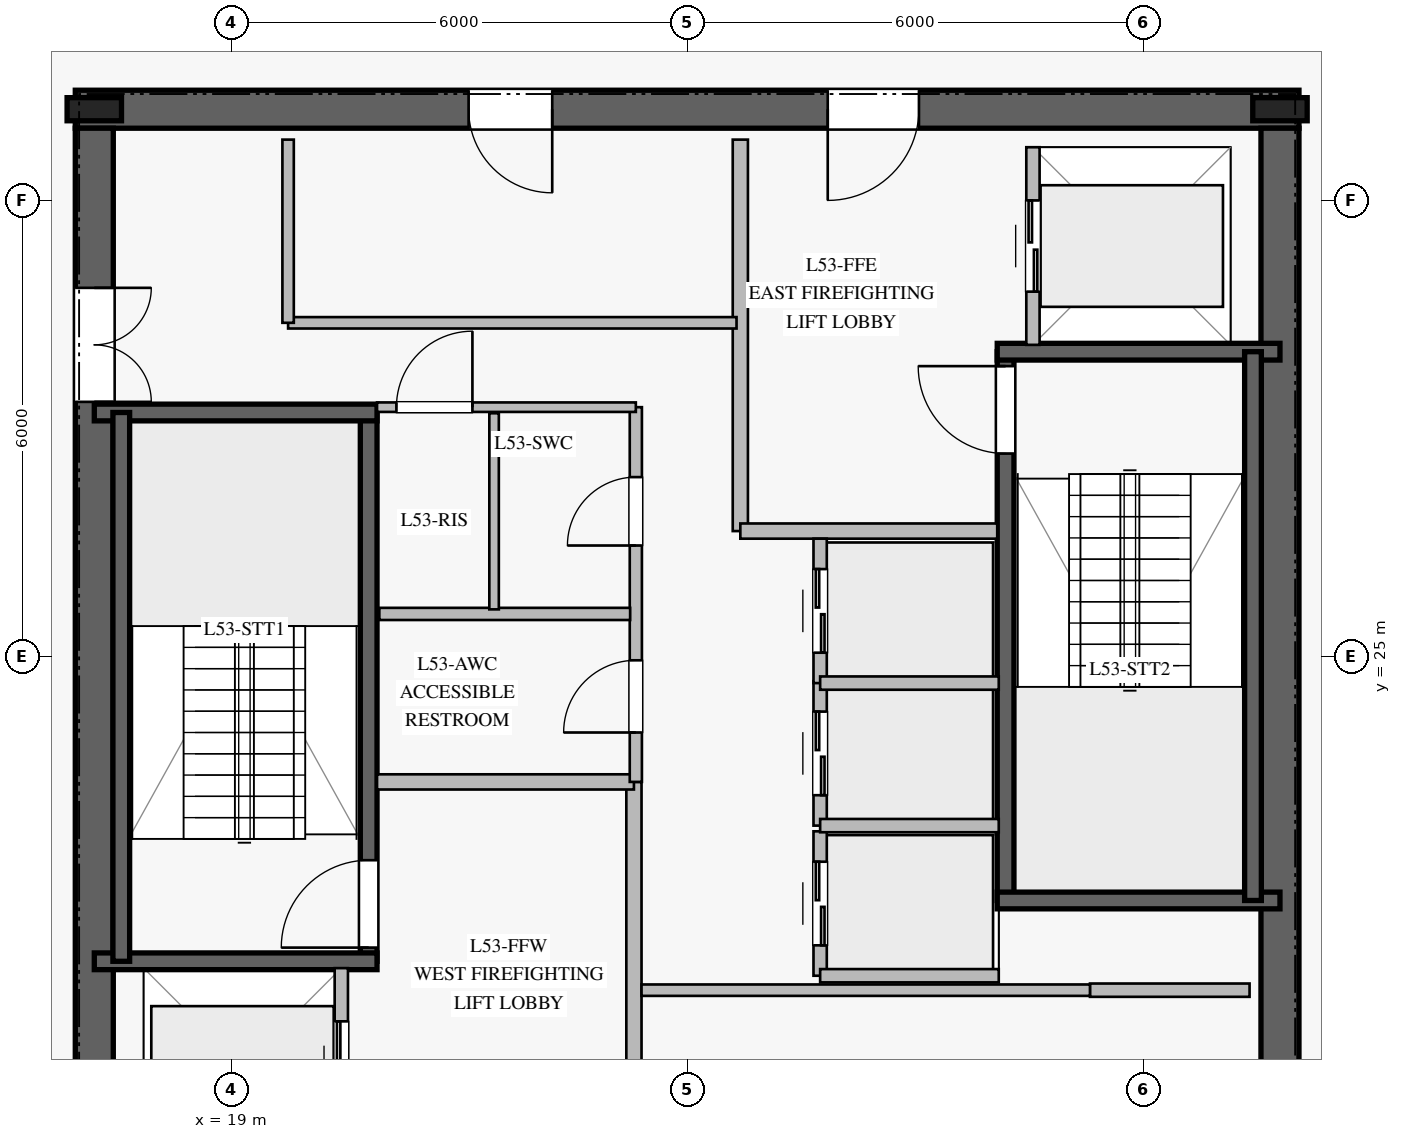
"""IFC4 building model, lengths in metres.
Left out: names, types, materials, properties, quantities, classifications, styles, units other than length and angle.
Written with IfcOpenShell. Run it as: python <this file> out.ifc"""

import sys

from ifc_helpers import new_model, si_unit, direction, frame, frame_2d, origin, origin_2d, place, context, subcontext, project, spatial, rectangle, i_section, extrude, element, fill, save


model = new_model("IFC4")
c1 = context("Model", 3, precision=1e-05, world=origin(), true_north=direction((0.0, 1.0)))
c2 = subcontext(c1, "Body", "Model", "MODEL_VIEW")
j1 = project(units=[si_unit("LENGTHUNIT", "METRE"), si_unit("PLANEANGLEUNIT", "RADIAN")], contexts=[c1])
p1 = place(None, origin())
s1 = spatial("IfcSite", under=j1, at=p1, CompositionType="ELEMENT")
p2 = place(p1, origin())
s2 = spatial("IfcBuilding", under=s1, at=p2, CompositionType="ELEMENT")
p3 = place(p2, frame((0.0, 0.0, 220.8)))
s3 = spatial("IfcBuildingStorey", under=s2, at=p3, CompositionType="ELEMENT", Elevation=220.8)
p4 = place(p3, frame((33.05, 32.2, 0.0), z_axis=(0.0, 0.0, 1.0), x_axis=(-1.0, 0.0, 0.0)))
e1 = element("IfcWall", 1, at=p4, inside=s3, PredefinedType="SHEAR", context=c2, shape_type="SweptSolid", body=[
    extrude(rectangle(XDim=16.1, YDim=0.5, at=frame_2d((8.05, 0.0))), origin(), (0.0, 0.0, 1.0), 3.78),
])
p5 = place(p4, frame((5.0, 0.0, 0.0)))
e2 = element("IfcOpeningElement", 2, at=p5, cuts=e1, PredefinedType="OPENING", context=c2, shape_type="SweptSolid", body=[
    extrude(rectangle(XDim=1.2, YDim=2.25, at=frame_2d((0.6, 1.125))), frame((0.0, 0.26, 0.0), z_axis=(0.0, -1.0, 0.0), x_axis=(1.0, 0.0, 0.0)), (0.0, 0.0, 1.0), 0.52),
])
p6 = place(p4, frame((9.825, 0.0, 0.0)))
e3 = element("IfcOpeningElement", 3, at=p6, cuts=e1, PredefinedType="OPENING", context=c2, shape_type="SweptSolid", body=[
    extrude(rectangle(XDim=1.1, YDim=2.2, at=frame_2d((0.55, 1.1))), frame((0.0, 0.26, 0.0), z_axis=(0.0, -1.0, 0.0), x_axis=(1.0, 0.0, 0.0)), (0.0, 0.0, 1.0), 0.52),
])
p7 = place(p3, frame((17.2, 31.95, 0.0), z_axis=(0.0, 0.0, 1.0), x_axis=(0.0, -1.0, 0.0)))
e4 = element("IfcWall", 4, at=p7, inside=s3, PredefinedType="SHEAR", context=c2, shape_type="SweptSolid", body=[
    extrude(rectangle(XDim=13.9, YDim=0.5, at=frame_2d((6.95, 0.0))), origin(), (0.0, 0.0, 1.0), 3.78),
])
p8 = place(p7, frame((2.1, 0.0, 0.0)))
e5 = element("IfcOpeningElement", 5, at=p8, cuts=e4, PredefinedType="OPENING", context=c2, shape_type="SweptSolid", body=[
    extrude(rectangle(XDim=1.5, YDim=2.2, at=frame_2d((0.75, 1.1))), frame((0.0, 0.26, 0.0), z_axis=(0.0, -1.0, 0.0), x_axis=(1.0, 0.0, 0.0)), (0.0, 0.0, 1.0), 0.52),
])
p9 = place(p3, frame((32.8, 18.05, 0.0), z_axis=(0.0, 0.0, 1.0), x_axis=(0.0, 1.0, 0.0)))
e6 = element("IfcWall", 6, at=p9, inside=s3, PredefinedType="SHEAR", context=c2, shape_type="SweptSolid", body=[
    extrude(rectangle(XDim=13.9, YDim=0.5, at=frame_2d((6.95, 0.0))), origin(), (0.0, 0.0, 1.0), 3.78),
])
for number, where, z_axis, x_axis in (
    (7, (32.8, 32.2, 0.0), (0.0, 0.0, 1.0), (1.0, 0.0, 0.0)),
    (8, (17.2, 32.2, 0.0), (0.0, 0.0, 1.0), (1.0, 0.0, 0.0)),
):
    element("IfcColumn", number, at=place(p3, frame(where, z_axis=z_axis, x_axis=x_axis)), inside=s3, PredefinedType="COLUMN", context=c2, shape_type="SweptSolid", body=[
        extrude(i_section(OverallWidth=0.304, OverallDepth=0.716, WebThickness=0.021, FlangeThickness=0.04, at=origin_2d()), origin(), (0.0, 0.0, 1.0), 4.0),
    ])
p10 = place(p3, frame((20.81, 20.99, 0.0), z_axis=(0.0, 0.0, 1.0), x_axis=(0.0, 1.0, 0.0)))
e9 = element("IfcWall", 9, at=p10, inside=s3, PredefinedType="SOLIDWALL", context=c2, shape_type="SweptSolid", body=[
    extrude(rectangle(XDim=7.22, YDim=0.22, at=frame_2d((3.61, 0.0))), origin(), (0.0, 0.0, 1.0), 3.78),
])
p11 = place(p10, frame((0.18, 0.0, 0.0)))
e10 = element("IfcOpeningElement", 10, at=p11, cuts=e9, PredefinedType="OPENING", context=c2, shape_type="SweptSolid", body=[
    extrude(rectangle(XDim=1.15, YDim=2.2, at=frame_2d((0.575, 1.1))), frame((0.0, 0.12, 0.0), z_axis=(0.0, -1.0, 0.0), x_axis=(1.0, 0.0, 0.0)), (0.0, 0.0, 1.0), 0.24),
])
for number, where, z_axis, x_axis in (
    (11, (17.2, 20.99, 0.0), (0.0, 0.0, 1.0), (1.0, 0.0, 0.0)),
    (12, (17.2, 28.21, 0.0), (0.0, 0.0, 1.0), (1.0, 0.0, 0.0)),
):
    element("IfcWall", number, at=place(p3, frame(where, z_axis=z_axis, x_axis=x_axis)), inside=s3, PredefinedType="SOLIDWALL", context=c2, shape_type="SweptSolid", body=[
        extrude(rectangle(XDim=3.72, YDim=0.22, at=frame_2d((1.86, 0.0))), origin(), (0.0, 0.0, 1.0), 3.78),
    ])
p12 = place(p3, frame((17.555, 28.21, 0.0), z_axis=(0.0, 0.0, 1.0), x_axis=(0.0, -1.0, 0.0)))
e13 = element("IfcWall", 13, at=p12, inside=s3, PredefinedType="SOLIDWALL", context=c2, shape_type="SweptSolid", body=[
    extrude(rectangle(XDim=7.22, YDim=0.22, at=frame_2d((3.61, 0.0))), origin(), (0.0, 0.0, 1.0), 3.78),
])
p13 = place(p3, frame((29.19, 21.79, 0.0), z_axis=(0.0, 0.0, 1.0), x_axis=(0.0, 1.0, 0.0)))
e14 = element("IfcWall", 14, at=p13, inside=s3, PredefinedType="SOLIDWALL", context=c2, shape_type="SweptSolid", body=[
    extrude(rectangle(XDim=7.22, YDim=0.22, at=frame_2d((3.61, 0.0))), origin(), (0.0, 0.0, 1.0), 3.78),
])
p14 = place(p13, frame((5.88, 0.0, 0.0)))
e15 = element("IfcOpeningElement", 15, at=p14, cuts=e14, PredefinedType="OPENING", context=c2, shape_type="SweptSolid", body=[
    extrude(rectangle(XDim=1.15, YDim=2.2, at=frame_2d((0.575, 1.1))), frame((0.0, 0.12, 0.0), z_axis=(0.0, -1.0, 0.0), x_axis=(1.0, 0.0, 0.0)), (0.0, 0.0, 1.0), 0.24),
])
for number, where, z_axis, x_axis in (
    (16, (29.08, 21.79, 0.0), (0.0, 0.0, 1.0), (1.0, 0.0, 0.0)),
    (17, (29.08, 29.01, 0.0), (0.0, 0.0, 1.0), (1.0, 0.0, 0.0)),
):
    element("IfcWall", number, at=place(p3, frame(where, z_axis=z_axis, x_axis=x_axis)), inside=s3, PredefinedType="SOLIDWALL", context=c2, shape_type="SweptSolid", body=[
        extrude(rectangle(XDim=3.72, YDim=0.22, at=frame_2d((1.86, 0.0))), origin(), (0.0, 0.0, 1.0), 3.78),
    ])
p15 = place(p3, frame((32.445, 29.01, 0.0), z_axis=(0.0, 0.0, 1.0), x_axis=(0.0, -1.0, 0.0)))
e18 = element("IfcWall", 18, at=p15, inside=s3, PredefinedType="SOLIDWALL", context=c2, shape_type="SweptSolid", body=[
    extrude(rectangle(XDim=7.22, YDim=0.22, at=frame_2d((3.61, 0.0))), origin(), (0.0, 0.0, 1.0), 3.78),
])
p16 = place(p3, frame((24.3, 18.2, 0.0), z_axis=(0.0, 0.0, 1.0), x_axis=(0.0, 1.0, 0.0)))
e19 = element("IfcWall", 19, at=p16, inside=s3, PredefinedType="PARTITIONING", context=c2, shape_type="SweptSolid", body=[
    extrude(rectangle(XDim=5.15, YDim=0.2, at=frame_2d((2.575, 0.0))), origin(), (0.0, 0.0, 1.0), 3.78),
])
p17 = place(p3, frame((20.92, 23.35, 0.0), z_axis=(0.0, 0.0, 1.0), x_axis=(1.0, 0.0, 0.0)))
e20 = element("IfcWall", 20, at=p17, inside=s3, PredefinedType="PARTITIONING", context=c2, shape_type="SweptSolid", body=[
    extrude(rectangle(XDim=3.38, YDim=0.2, at=frame_2d((1.69, 0.0))), origin(), (0.0, 0.0, 1.0), 3.78),
])
p18 = place(p3, frame((25.7, 26.65, 0.0), z_axis=(0.0, 0.0, 1.0), x_axis=(0.0, 1.0, 0.0)))
e21 = element("IfcWall", 21, at=p18, inside=s3, PredefinedType="PARTITIONING", context=c2, shape_type="SweptSolid", body=[
    extrude(rectangle(XDim=5.15, YDim=0.2, at=frame_2d((2.575, 0.0))), origin(), (0.0, 0.0, 1.0), 3.78),
])
p19 = place(p3, frame((25.7, 26.65, 0.0), z_axis=(0.0, 0.0, 1.0), x_axis=(1.0, 0.0, 0.0)))
e22 = element("IfcWall", 22, at=p19, inside=s3, PredefinedType="PARTITIONING", context=c2, shape_type="SweptSolid", body=[
    extrude(rectangle(XDim=3.38, YDim=0.2, at=frame_2d((1.69, 0.0))), origin(), (0.0, 0.0, 1.0), 3.78),
])
p20 = place(p3, frame((24.325, 23.35, 0.0), z_axis=(0.0, 0.0, 1.0), x_axis=(0.0, 1.0, 0.0)))
e23 = element("IfcWall", 23, at=p20, inside=s3, PredefinedType="PLUMBINGWALL", context=c2, shape_type="SweptSolid", body=[
    extrude(rectangle(XDim=4.93, YDim=0.16, at=frame_2d((2.465, 0.0))), origin(), (0.0, 0.0, 1.0), 3.78),
])
p21 = place(p20, frame((0.65, 0.0, 0.0)))
e24 = element("IfcOpeningElement", 24, at=p21, cuts=e23, PredefinedType="OPENING", context=c2, shape_type="SweptSolid", body=[
    extrude(rectangle(XDim=0.95, YDim=2.1, at=frame_2d((0.475, 1.05))), frame((0.0, 0.09, 0.0), z_axis=(0.0, -1.0, 0.0), x_axis=(1.0, 0.0, 0.0)), (0.0, 0.0, 1.0), 0.18),
])
p22 = place(p20, frame((3.11, 0.0, 0.0)))
e25 = element("IfcOpeningElement", 25, at=p22, cuts=e23, PredefinedType="OPENING", context=c2, shape_type="SweptSolid", body=[
    extrude(rectangle(XDim=0.9, YDim=2.1, at=frame_2d((0.45, 1.05))), frame((0.0, 0.09, 0.0), z_axis=(0.0, -1.0, 0.0), x_axis=(1.0, 0.0, 0.0)), (0.0, 0.0, 1.0), 0.18),
])
p23 = place(p3, frame((20.92, 28.28, 0.0), z_axis=(0.0, 0.0, 1.0), x_axis=(1.0, 0.0, 0.0)))
e26 = element("IfcWall", 26, at=p23, inside=s3, PredefinedType="PARTITIONING", context=c2, shape_type="SweptSolid", body=[
    extrude(rectangle(XDim=3.405, YDim=0.125, at=frame_2d((1.703, 0.0))), origin(), (0.0, 0.0, 1.0), 3.78),
])
p24 = place(p23, frame((0.255, 0.0, 0.0)))
e27 = element("IfcOpeningElement", 27, at=p24, cuts=e26, PredefinedType="OPENING", context=c2, shape_type="SweptSolid", body=[
    extrude(rectangle(XDim=1.0, YDim=2.15, at=frame_2d((0.5, 1.075))), frame((0.0, 0.073, 0.0), z_axis=(0.0, -1.0, 0.0), x_axis=(1.0, 0.0, 0.0)), (0.0, 0.0, 1.0), 0.145),
])
p25 = place(p3, frame((20.95, 25.56, 0.0), z_axis=(0.0, 0.0, 1.0), x_axis=(1.0, 0.0, 0.0)))
e28 = element("IfcWall", 28, at=p25, inside=s3, PredefinedType="PLUMBINGWALL", context=c2, shape_type="SweptSolid", body=[
    extrude(rectangle(XDim=3.3, YDim=0.16, at=frame_2d((1.65, 0.0))), origin(), (0.0, 0.0, 1.0), 3.78),
])
p26 = place(p3, frame((22.46, 25.62, 0.0), z_axis=(0.0, 0.0, 1.0), x_axis=(0.0, 1.0, 0.0)))
e29 = element("IfcWall", 29, at=p26, inside=s3, PredefinedType="PARTITIONING", context=c2, shape_type="SweptSolid", body=[
    extrude(rectangle(XDim=2.58, YDim=0.125, at=frame_2d((1.29, 0.0))), origin(), (0.0, 0.0, 1.0), 3.78),
])
p27 = place(p3, frame((30.3, 20.61, 0.0), z_axis=(0.0, 0.0, 1.0), x_axis=(1.0, 0.0, 0.0)))
e30 = element("IfcWall", 30, at=p27, inside=s3, PredefinedType="PARTITIONING", context=c2, shape_type="SweptSolid", body=[
    extrude(rectangle(XDim=2.1, YDim=0.175, at=frame_2d((1.05, 0.0))), origin(), (0.0, 0.0, 1.0), 3.78),
])
p28 = place(p3, frame((24.4, 20.61, 0.0), z_axis=(0.0, 0.0, 1.0), x_axis=(1.0, 0.0, 0.0)))
e31 = element("IfcWall", 31, at=p28, inside=s3, PredefinedType="PARTITIONING", context=c2, shape_type="SweptSolid", body=[
    extrude(rectangle(XDim=5.9, YDim=0.15, at=frame_2d((2.95, 0.0))), origin(), (0.0, 0.0, 1.0), 3.78),
])
p29 = place(p3, frame((19.75, 29.39, 0.0), z_axis=(0.0, 0.0, 1.0), x_axis=(1.0, 0.0, 0.0)))
e32 = element("IfcWall", 32, at=p29, inside=s3, PredefinedType="PARTITIONING", context=c2, shape_type="SweptSolid", body=[
    extrude(rectangle(XDim=5.9, YDim=0.15, at=frame_2d((2.95, 0.0))), origin(), (0.0, 0.0, 1.0), 3.78),
])
p30 = place(p3, frame((19.75, 29.39, 0.0), z_axis=(0.0, 0.0, 1.0), x_axis=(0.0, 1.0, 0.0)))
e33 = element("IfcWall", 33, at=p30, inside=s3, PredefinedType="PARTITIONING", context=c2, shape_type="SweptSolid", body=[
    extrude(rectangle(XDim=2.41, YDim=0.15, at=frame_2d((1.205, 0.0))), origin(), (0.0, 0.0, 1.0), 3.78),
])
p31 = place(p3, frame((26.75, 20.8, 0.0), z_axis=(0.0, 0.0, 1.0), x_axis=(0.0, 1.0, 0.0)))
e34 = element("IfcWall", 34, at=p31, inside=s3, PredefinedType="PARTITIONING", context=c2, shape_type="SweptSolid", body=[
    extrude(rectangle(XDim=1.9, YDim=0.175, at=frame_2d((0.95, 0.0))), origin(), (0.0, 0.0, 1.0), 3.78),
])
p32 = place(p31, frame((0.4, 0.0, 0.0)))
e35 = element("IfcOpeningElement", 35, at=p32, cuts=e34, PredefinedType="OPENING", context=c2, shape_type="SweptSolid", body=[
    extrude(rectangle(XDim=1.1, YDim=2.2, at=frame_2d((0.55, 1.1))), frame((0.0, 0.098, 0.0), z_axis=(0.0, -1.0, 0.0), x_axis=(1.0, 0.0, 0.0)), (0.0, 0.0, 1.0), 0.195),
])
p33 = place(p3, frame((26.75, 20.8, 0.0), z_axis=(0.0, 0.0, 1.0), x_axis=(1.0, 0.0, 0.0)))
e36 = element("IfcWall", 36, at=p33, inside=s3, PredefinedType="PARTITIONING", context=c2, shape_type="SweptSolid", body=[
    extrude(rectangle(XDim=2.35, YDim=0.175, at=frame_2d((1.175, 0.0))), origin(), (0.0, 0.0, 1.0), 3.78),
])
p34 = place(p3, frame((26.75, 22.775, 0.0), z_axis=(0.0, 0.0, 1.0), x_axis=(0.0, 1.0, 0.0)))
e37 = element("IfcWall", 37, at=p34, inside=s3, PredefinedType="PARTITIONING", context=c2, shape_type="SweptSolid", body=[
    extrude(rectangle(XDim=1.9, YDim=0.175, at=frame_2d((0.95, 0.0))), origin(), (0.0, 0.0, 1.0), 3.78),
])
p35 = place(p34, frame((0.4, 0.0, 0.0)))
e38 = element("IfcOpeningElement", 38, at=p35, cuts=e37, PredefinedType="OPENING", context=c2, shape_type="SweptSolid", body=[
    extrude(rectangle(XDim=1.1, YDim=2.2, at=frame_2d((0.55, 1.1))), frame((0.0, 0.098, 0.0), z_axis=(0.0, -1.0, 0.0), x_axis=(1.0, 0.0, 0.0)), (0.0, 0.0, 1.0), 0.195),
])
p36 = place(p3, frame((26.75, 22.775, 0.0), z_axis=(0.0, 0.0, 1.0), x_axis=(1.0, 0.0, 0.0)))
e39 = element("IfcWall", 39, at=p36, inside=s3, PredefinedType="PARTITIONING", context=c2, shape_type="SweptSolid", body=[
    extrude(rectangle(XDim=2.35, YDim=0.175, at=frame_2d((1.175, 0.0))), origin(), (0.0, 0.0, 1.0), 3.78),
])
p37 = place(p3, frame((26.75, 24.65, 0.0), z_axis=(0.0, 0.0, 1.0), x_axis=(0.0, 1.0, 0.0)))
e40 = element("IfcWall", 40, at=p37, inside=s3, PredefinedType="PARTITIONING", context=c2, shape_type="SweptSolid", body=[
    extrude(rectangle(XDim=1.9, YDim=0.175, at=frame_2d((0.95, 0.0))), origin(), (0.0, 0.0, 1.0), 3.78),
])
p38 = place(p37, frame((0.4, 0.0, 0.0)))
e41 = element("IfcOpeningElement", 41, at=p38, cuts=e40, PredefinedType="OPENING", context=c2, shape_type="SweptSolid", body=[
    extrude(rectangle(XDim=1.1, YDim=2.2, at=frame_2d((0.55, 1.1))), frame((0.0, 0.098, 0.0), z_axis=(0.0, -1.0, 0.0), x_axis=(1.0, 0.0, 0.0)), (0.0, 0.0, 1.0), 0.195),
])
p39 = place(p3, frame((26.75, 24.65, 0.0), z_axis=(0.0, 0.0, 1.0), x_axis=(1.0, 0.0, 0.0)))
e42 = element("IfcWall", 42, at=p39, inside=s3, PredefinedType="PARTITIONING", context=c2, shape_type="SweptSolid", body=[
    extrude(rectangle(XDim=2.35, YDim=0.175, at=frame_2d((1.175, 0.0))), origin(), (0.0, 0.0, 1.0), 3.78),
])
p40 = place(p3, frame((20.45, 18.3, 0.0), z_axis=(0.0, 0.0, 1.0), x_axis=(0.0, 1.0, 0.0)))
e43 = element("IfcWall", 43, at=p40, inside=s3, PredefinedType="PARTITIONING", context=c2, shape_type="SweptSolid", body=[
    extrude(rectangle(XDim=2.6, YDim=0.175, at=frame_2d((1.3, 0.0))), origin(), (0.0, 0.0, 1.0), 3.78),
])
p41 = place(p40, frame((0.7, 0.0, 0.0)))
e44 = element("IfcOpeningElement", 44, at=p41, cuts=e43, PredefinedType="OPENING", context=c2, shape_type="SweptSolid", body=[
    extrude(rectangle(XDim=1.2, YDim=2.2, at=frame_2d((0.6, 1.1))), frame((0.0, 0.098, 0.0), z_axis=(0.0, -1.0, 0.0), x_axis=(1.0, 0.0, 0.0)), (0.0, 0.0, 1.0), 0.195),
])
p42 = place(p3, frame((29.55, 29.1, 0.0), z_axis=(0.0, 0.0, 1.0), x_axis=(0.0, 1.0, 0.0)))
e45 = element("IfcWall", 45, at=p42, inside=s3, PredefinedType="PARTITIONING", context=c2, shape_type="SweptSolid", body=[
    extrude(rectangle(XDim=2.6, YDim=0.175, at=frame_2d((1.3, 0.0))), origin(), (0.0, 0.0, 1.0), 3.78),
])
p43 = place(p42, frame((0.7, 0.0, 0.0)))
e46 = element("IfcOpeningElement", 46, at=p43, cuts=e45, PredefinedType="OPENING", context=c2, shape_type="SweptSolid", body=[
    extrude(rectangle(XDim=1.2, YDim=2.2, at=frame_2d((0.6, 1.1))), frame((0.0, 0.098, 0.0), z_axis=(0.0, -1.0, 0.0), x_axis=(1.0, 0.0, 0.0)), (0.0, 0.0, 1.0), 0.195),
])
p44 = place(p11, origin())
e47 = element("IfcDoor", 47, at=p44, inside=s3, OperationType="SINGLE_SWING_LEFT", PredefinedType="DOOR", context=c2, shape_type="SweptSolid", body=[
    extrude(rectangle(XDim=1.15, YDim=2.2, at=frame_2d((0.575, 1.1))), frame((0.0, 0.025, 0.0), z_axis=(0.0, -1.0, 0.0), x_axis=(1.0, 0.0, 0.0)), (0.0, 0.0, 1.0), 0.05),
])
fill(e10, e47)
p45 = place(p14, origin())
e48 = element("IfcDoor", 48, at=p45, inside=s3, OperationType="SINGLE_SWING_RIGHT", PredefinedType="DOOR", context=c2, shape_type="SweptSolid", body=[
    extrude(rectangle(XDim=1.15, YDim=2.2, at=frame_2d((0.575, 1.1))), frame((0.0, 0.025, 0.0), z_axis=(0.0, -1.0, 0.0), x_axis=(1.0, 0.0, 0.0)), (0.0, 0.0, 1.0), 0.05),
])
fill(e15, e48)
p46 = place(p5, origin())
e49 = element("IfcDoor", 49, at=p46, inside=s3, OperationType="SINGLE_SWING_RIGHT", PredefinedType="DOOR", context=c2, shape_type="SweptSolid", body=[
    extrude(rectangle(XDim=1.2, YDim=2.25, at=frame_2d((0.6, 1.125))), frame((0.0, 0.025, 0.0), z_axis=(0.0, -1.0, 0.0), x_axis=(1.0, 0.0, 0.0)), (0.0, 0.0, 1.0), 0.05),
])
fill(e2, e49)
p47 = place(p8, origin())
e50 = element("IfcDoor", 50, at=p47, inside=s3, OperationType="DOUBLE_DOOR_SINGLE_SWING", PredefinedType="DOOR", context=c2, shape_type="SweptSolid", body=[
    extrude(rectangle(XDim=1.5, YDim=2.2, at=frame_2d((0.75, 1.1))), frame((0.0, 0.025, 0.0), z_axis=(0.0, -1.0, 0.0), x_axis=(1.0, 0.0, 0.0)), (0.0, 0.0, 1.0), 0.05),
])
fill(e5, e50)
p48 = place(p21, origin())
e51 = element("IfcDoor", 51, at=p48, inside=s3, OperationType="SINGLE_SWING_LEFT", PredefinedType="DOOR", context=c2, shape_type="SweptSolid", body=[
    extrude(rectangle(XDim=0.95, YDim=2.1, at=frame_2d((0.475, 1.05))), frame((0.0, 0.025, 0.0), z_axis=(0.0, -1.0, 0.0), x_axis=(1.0, 0.0, 0.0)), (0.0, 0.0, 1.0), 0.05),
])
fill(e24, e51)
p49 = place(p24, origin())
e52 = element("IfcDoor", 52, at=p49, inside=s3, OperationType="SINGLE_SWING_RIGHT", PredefinedType="DOOR", context=c2, shape_type="SweptSolid", body=[
    extrude(rectangle(XDim=1.0, YDim=2.15, at=frame_2d((0.5, 1.075))), frame((0.0, 0.025, 0.0), z_axis=(0.0, -1.0, 0.0), x_axis=(1.0, 0.0, 0.0)), (0.0, 0.0, 1.0), 0.05),
])
fill(e27, e52)
p50 = place(p22, origin())
e53 = element("IfcDoor", 53, at=p50, inside=s3, OperationType="SINGLE_SWING_LEFT", PredefinedType="DOOR", context=c2, shape_type="SweptSolid", body=[
    extrude(rectangle(XDim=0.9, YDim=2.1, at=frame_2d((0.45, 1.05))), frame((0.0, 0.025, 0.0), z_axis=(0.0, -1.0, 0.0), x_axis=(1.0, 0.0, 0.0)), (0.0, 0.0, 1.0), 0.05),
])
fill(e25, e53)
p51 = place(p6, origin())
e54 = element("IfcDoor", 54, at=p51, inside=s3, OperationType="SINGLE_SWING_LEFT", PredefinedType="DOOR", context=c2, shape_type="SweptSolid", body=[
    extrude(rectangle(XDim=1.1, YDim=2.2, at=frame_2d((0.55, 1.1))), frame((0.0, 0.025, 0.0), z_axis=(0.0, -1.0, 0.0), x_axis=(1.0, 0.0, 0.0)), (0.0, 0.0, 1.0), 0.05),
])
fill(e3, e54)
p52 = place(p32, origin())
e55 = element("IfcDoor", 55, at=p52, inside=s3, OperationType="DOUBLE_DOOR_SLIDING", PredefinedType="DOOR", context=c2, shape_type="SweptSolid", body=[
    extrude(rectangle(XDim=1.1, YDim=2.2, at=frame_2d((0.55, 1.1))), frame((0.0, 0.025, 0.0), z_axis=(0.0, -1.0, 0.0), x_axis=(1.0, 0.0, 0.0)), (0.0, 0.0, 1.0), 0.05),
])
fill(e35, e55)
p53 = place(p35, origin())
e56 = element("IfcDoor", 56, at=p53, inside=s3, OperationType="DOUBLE_DOOR_SLIDING", PredefinedType="DOOR", context=c2, shape_type="SweptSolid", body=[
    extrude(rectangle(XDim=1.1, YDim=2.2, at=frame_2d((0.55, 1.1))), frame((0.0, 0.025, 0.0), z_axis=(0.0, -1.0, 0.0), x_axis=(1.0, 0.0, 0.0)), (0.0, 0.0, 1.0), 0.05),
])
fill(e38, e56)
p54 = place(p38, origin())
e57 = element("IfcDoor", 57, at=p54, inside=s3, OperationType="DOUBLE_DOOR_SLIDING", PredefinedType="DOOR", context=c2, shape_type="SweptSolid", body=[
    extrude(rectangle(XDim=1.1, YDim=2.2, at=frame_2d((0.55, 1.1))), frame((0.0, 0.025, 0.0), z_axis=(0.0, -1.0, 0.0), x_axis=(1.0, 0.0, 0.0)), (0.0, 0.0, 1.0), 0.05),
])
fill(e41, e57)
p55 = place(p41, origin())
e58 = element("IfcDoor", 58, at=p55, inside=s3, OperationType="DOUBLE_DOOR_SLIDING", PredefinedType="DOOR", context=c2, shape_type="SweptSolid", body=[
    extrude(rectangle(XDim=1.2, YDim=2.2, at=frame_2d((0.6, 1.1))), frame((0.0, 0.025, 0.0), z_axis=(0.0, -1.0, 0.0), x_axis=(1.0, 0.0, 0.0)), (0.0, 0.0, 1.0), 0.05),
])
fill(e44, e58)
p56 = place(p43, origin())
e59 = element("IfcDoor", 59, at=p56, inside=s3, OperationType="DOUBLE_DOOR_SLIDING", PredefinedType="DOOR", context=c2, shape_type="SweptSolid", body=[
    extrude(rectangle(XDim=1.2, YDim=2.2, at=frame_2d((0.6, 1.1))), frame((0.0, 0.025, 0.0), z_axis=(0.0, -1.0, 0.0), x_axis=(1.0, 0.0, 0.0)), (0.0, 0.0, 1.0), 0.05),
])
fill(e46, e59)
save(model, sys.argv[1])
